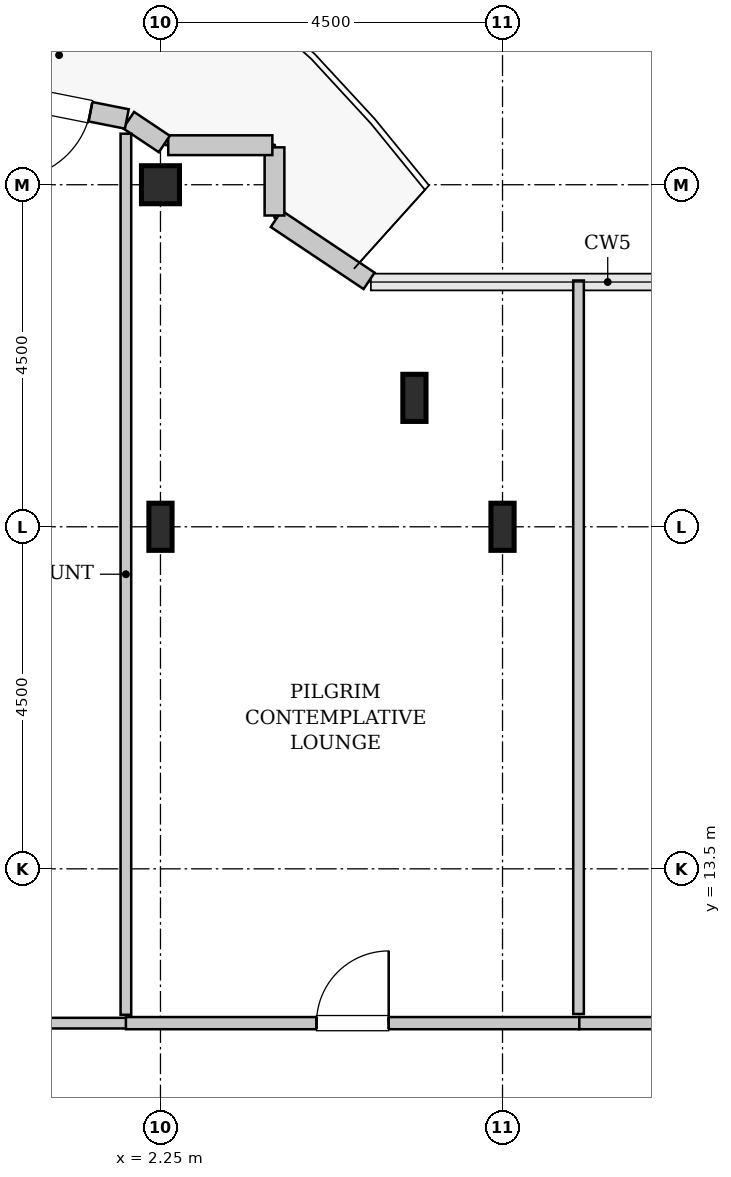
"""IFC4 building model, lengths in metres.
Left out: names, types, materials, properties, quantities, classifications, styles, units other than length and angle.
Written with IfcOpenShell. Run it as: python <this file> out.ifc"""

import sys

from ifc_helpers import new_model, si_unit, direction, frame, frame_2d, origin, origin_2d, place, context, subcontext, project, spatial, rectangle, hollow_rectangle, i_section, extrude, source, transform, mapped, element, fill, save


model = new_model("IFC4")
c1 = context("Model", 3, precision=1e-05, world=origin(), true_north=direction((0.0, 1.0)))
c2 = subcontext(c1, "Body", "Model", "MODEL_VIEW")
j1 = project(units=[si_unit("LENGTHUNIT", "METRE"), si_unit("PLANEANGLEUNIT", "RADIAN")], contexts=[c1])
p1 = place(None, origin())
s1 = spatial("IfcSite", under=j1, at=p1, CompositionType="ELEMENT")
p2 = place(p1, origin())
s2 = spatial("IfcBuilding", under=s1, at=p2, CompositionType="ELEMENT")
p3 = place(p2, frame((0.0, 0.0, 330.0)))
s3 = spatial("IfcBuildingStorey", under=s2, at=p3, CompositionType="ELEMENT", Elevation=330.0)
m1 = source(origin(), c2, "Body", "SweptSolid", [
    extrude(i_section(OverallWidth=0.305, OverallDepth=0.62, WebThickness=0.021, FlangeThickness=0.04, FilletRadius=0.027, at=origin_2d()), origin(), (0.0, 0.0, 1.0), 3.8),
])
p4 = place(p3, frame((2.25, 18.0, 0.0), z_axis=(0.0, 0.0, 1.0), x_axis=(1.0, 0.0, 0.0)))
e1 = element("IfcColumn", 1, at=p4, inside=s3, PredefinedType="COLUMN", context=c2, shape_type="MappedRepresentation", body=[
    mapped(m1, transform((0.0, 0.0, 0.0), x_axis=(1.0, 0.0, 0.0), y_axis=(0.0, 1.0, 0.0), z_axis=(0.0, 0.0, 1.0), scale=1.0)),
])
m2 = source(origin(), c2, "Body", "SweptSolid", [
    extrude(hollow_rectangle(XDim=0.5, YDim=0.5, WallThickness=0.025, InnerFilletRadius=0.025, OuterFilletRadius=0.05, at=origin_2d()), origin(), (0.0, 0.0, 1.0), 3.8),
])
p5 = place(p3, frame((2.25, 22.5, 0.0), z_axis=(0.0, 0.0, 1.0), x_axis=(1.0, 0.0, 0.0)))
e2 = element("IfcColumn", 2, at=p5, inside=s3, PredefinedType="COLUMN", context=c2, shape_type="MappedRepresentation", body=[
    mapped(m2, transform((0.0, 0.0, 0.0), x_axis=(1.0, 0.0, 0.0), y_axis=(0.0, 1.0, 0.0), z_axis=(0.0, 0.0, 1.0), scale=1.0)),
])
for number, where, z_axis, x_axis in (
    (3, (5.591, 19.696, 0.0), (0.0, 0.0, 1.0), (1.0, 0.0, 0.0)),
    (4, (6.75, 18.0, 0.0), (0.0, 0.0, 1.0), (1.0, 0.0, 0.0)),
):
    element("IfcColumn", number, at=place(p3, frame(where, z_axis=z_axis, x_axis=x_axis)), inside=s3, PredefinedType="COLUMN", context=c2, shape_type="MappedRepresentation", body=[
        mapped(m1, transform((0.0, 0.0, 0.0), x_axis=(1.0, 0.0, 0.0), y_axis=(0.0, 1.0, 0.0), z_axis=(0.0, 0.0, 1.0), scale=1.0)),
    ])
m3 = source(origin(), c2, "Body", "SweptSolid", [
    extrude(rectangle(XDim=1.469, YDim=0.26, at=frame_2d((0.734, 0.0))), origin(), (0.0, 0.0, 1.0), 3.55),
])
p6 = place(p3, frame((4.995, 21.236, 0.0), z_axis=(0.0, 0.0, 1.0), x_axis=(-0.831461760506, 0.555581983884, 0.0)))
e5 = element("IfcWall", 5, at=p6, inside=s3, PredefinedType="SOLIDWALL", context=c2, shape_type="MappedRepresentation", body=[
    mapped(m3, transform((0.0, 0.0, 0.0), x_axis=(1.0, 0.0, 0.0), y_axis=(0.0, 1.0, 0.0), z_axis=(0.0, 0.0, 1.0), scale=1.0)),
])
m4 = source(origin(), c2, "Body", "SweptSolid", [
    extrude(rectangle(XDim=0.897, YDim=0.26, at=frame_2d((0.448, 0.0))), origin(), (0.0, 0.0, 1.0), 3.55),
])
p7 = place(p3, frame((3.75, 22.095, 0.0), z_axis=(0.0, 0.0, 1.0), x_axis=(0.0, 1.0, 0.0)))
e6 = element("IfcWall", 6, at=p7, inside=s3, PredefinedType="SOLIDWALL", context=c2, shape_type="MappedRepresentation", body=[
    mapped(m4, transform((0.0, 0.0, 0.0), x_axis=(1.0, 0.0, 0.0), y_axis=(0.0, 1.0, 0.0), z_axis=(0.0, 0.0, 1.0), scale=1.0)),
])
m5 = source(origin(), c2, "Body", "SweptSolid", [
    extrude(rectangle(XDim=1.37, YDim=0.26, at=frame_2d((0.685, 0.0))), origin(), (0.0, 0.0, 1.0), 3.55),
])
p8 = place(p3, frame((3.722, 23.02, 0.0), z_axis=(0.0, 0.0, 1.0), x_axis=(-1.0, 0.0, 0.0)))
e7 = element("IfcWall", 7, at=p8, inside=s3, PredefinedType="SOLIDWALL", context=c2, shape_type="MappedRepresentation", body=[
    mapped(m5, transform((0.0, 0.0, 0.0), x_axis=(1.0, 0.0, 0.0), y_axis=(0.0, 1.0, 0.0), z_axis=(0.0, 0.0, 1.0), scale=1.0)),
])
m6 = source(origin(), c2, "Body", "SweptSolid", [
    extrude(rectangle(XDim=0.565, YDim=0.26, at=frame_2d((0.283, 0.0))), origin(), (0.0, 0.0, 1.0), 3.55),
])
p9 = place(p3, frame((2.301, 23.036, 0.0), z_axis=(0.0, 0.0, 1.0), x_axis=(-0.831651492666, 0.555297933317, 0.0)))
e8 = element("IfcWall", 8, at=p9, inside=s3, PredefinedType="SOLIDWALL", context=c2, shape_type="MappedRepresentation", body=[
    mapped(m6, transform((0.0, 0.0, 0.0), x_axis=(1.0, 0.0, 0.0), y_axis=(0.0, 1.0, 0.0), z_axis=(0.0, 0.0, 1.0), scale=1.0)),
])
m7 = source(origin(), c2, "Body", "SweptSolid", [
    extrude(rectangle(XDim=4.137, YDim=0.26, at=frame_2d((2.068, 0.0))), origin(), (0.0, 0.0, 1.0), 3.55),
])
p10 = place(p3, frame((1.807, 23.365, 0.0), z_axis=(0.0, 0.0, 1.0), x_axis=(-0.980782170794, 0.195105954428, 0.0)))
e9 = element("IfcWall", 9, at=p10, inside=s3, PredefinedType="SOLIDWALL", context=c2, shape_type="MappedRepresentation", body=[
    mapped(m7, transform((0.0, 0.0, 0.0), x_axis=(1.0, 0.0, 0.0), y_axis=(0.0, 1.0, 0.0), z_axis=(0.0, 0.0, 1.0), scale=1.0)),
])
p11 = place(p10, frame((0.488, 0.0, 0.0)))
e10 = element("IfcOpeningElement", 10, at=p11, cuts=e9, PredefinedType="OPENING", context=c2, shape_type="SweptSolid", body=[
    extrude(rectangle(XDim=1.1, YDim=2.2, at=frame_2d((0.55, 1.1))), frame((0.0, 0.14, 0.0), z_axis=(0.0, -1.0, 0.0), x_axis=(1.0, 0.0, 0.0)), (0.0, 0.0, 1.0), 0.28),
])
m8 = source(origin(), c2, "Body", "SweptSolid", [
    extrude(rectangle(XDim=4.625, YDim=0.14, at=frame_2d((2.312, 0.0))), origin(), (0.0, 0.0, 1.0), 3.535),
])
p12 = place(p3, frame((-2.82, 11.47, 0.0), z_axis=(0.0, 0.0, 1.0), x_axis=(1.0, 0.0, 0.0)))
e11 = element("IfcWall", 11, at=p12, inside=s3, PredefinedType="PARTITIONING", context=c2, shape_type="MappedRepresentation", body=[
    mapped(m8, transform((0.0, 0.0, 0.0), x_axis=(1.0, 0.0, 0.0), y_axis=(0.0, 1.0, 0.0), z_axis=(0.0, 0.0, 1.0), scale=1.0)),
])
m9 = source(origin(), c2, "Body", "SweptSolid", [
    extrude(rectangle(XDim=11.591, YDim=0.14, at=frame_2d((5.796, 0.0))), origin(), (0.0, 0.0, 1.0), 2.975),
])
p13 = place(p3, frame((1.795, 11.58, 0.0), z_axis=(0.0, 0.0, 1.0), x_axis=(0.0, 1.0, 0.0)))
e12 = element("IfcWall", 12, at=p13, inside=s3, PredefinedType="PARTITIONING", context=c2, shape_type="MappedRepresentation", body=[
    mapped(m9, transform((0.0, 0.0, 0.0), x_axis=(1.0, 0.0, 0.0), y_axis=(0.0, 1.0, 0.0), z_axis=(0.0, 0.0, 1.0), scale=1.0)),
])
m10 = source(origin(), c2, "Body", "SweptSolid", [
    extrude(rectangle(XDim=5.965, YDim=0.16, at=frame_2d((2.982, 0.0))), origin(), (0.0, 0.0, 1.0), 3.535),
])
p14 = place(p3, frame((1.795, 11.47, 0.0), z_axis=(0.0, 0.0, 1.0), x_axis=(1.0, 0.0, 0.0)))
e13 = element("IfcWall", 13, at=p14, inside=s3, PredefinedType="PARTITIONING", context=c2, shape_type="MappedRepresentation", body=[
    mapped(m10, transform((0.0, 0.0, 0.0), x_axis=(1.0, 0.0, 0.0), y_axis=(0.0, 1.0, 0.0), z_axis=(0.0, 0.0, 1.0), scale=1.0)),
])
p15 = place(p14, frame((2.508, 0.0, 0.0)))
e14 = element("IfcOpeningElement", 14, at=p15, cuts=e13, PredefinedType="OPENING", context=c2, shape_type="SweptSolid", body=[
    extrude(rectangle(XDim=0.95, YDim=2.1, at=frame_2d((0.475, 1.05))), frame((0.0, 0.09, 0.0), z_axis=(0.0, -1.0, 0.0), x_axis=(1.0, 0.0, 0.0)), (0.0, 0.0, 1.0), 0.18),
])
m11 = source(origin(), c2, "Body", "SweptSolid", [
    extrude(rectangle(XDim=9.65, YDim=0.14, at=frame_2d((4.825, 0.0))), origin(), (0.0, 0.0, 1.0), 3.535),
])
p16 = place(p3, frame((7.75, 11.59, 0.0), z_axis=(0.0, 0.0, 1.0), x_axis=(0.0, 1.0, 0.0)))
e15 = element("IfcWall", 15, at=p16, inside=s3, PredefinedType="PARTITIONING", context=c2, shape_type="MappedRepresentation", body=[
    mapped(m11, transform((0.0, 0.0, 0.0), x_axis=(1.0, 0.0, 0.0), y_axis=(0.0, 1.0, 0.0), z_axis=(0.0, 0.0, 1.0), scale=1.0)),
])
m12 = source(origin(), c2, "Body", "SweptSolid", [
    extrude(rectangle(XDim=5.86, YDim=0.16, at=frame_2d((2.93, 0.0))), origin(), (0.0, 0.0, 1.0), 3.535),
])
p17 = place(p3, frame((7.76, 11.47, 0.0), z_axis=(0.0, 0.0, 1.0), x_axis=(1.0, 0.0, 0.0)))
e16 = element("IfcWall", 16, at=p17, inside=s3, PredefinedType="PARTITIONING", context=c2, shape_type="MappedRepresentation", body=[
    mapped(m12, transform((0.0, 0.0, 0.0), x_axis=(1.0, 0.0, 0.0), y_axis=(0.0, 1.0, 0.0), z_axis=(0.0, 0.0, 1.0), scale=1.0)),
])
p18 = place(p17, frame((2.455, 0.0, 0.0)))
e17 = element("IfcOpeningElement", 17, at=p18, cuts=e16, PredefinedType="OPENING", context=c2, shape_type="SweptSolid", body=[
    extrude(rectangle(XDim=0.95, YDim=2.1, at=frame_2d((0.475, 1.05))), frame((0.0, 0.09, 0.0), z_axis=(0.0, -1.0, 0.0), x_axis=(1.0, 0.0, 0.0)), (0.0, 0.0, 1.0), 0.18),
])
m13 = source(origin(), c2, "Body", "SweptSolid", [
    extrude(rectangle(XDim=1.1, YDim=2.2, at=frame_2d((0.55, 1.1))), frame((0.0, 0.025, 0.0), z_axis=(0.0, -1.0, 0.0), x_axis=(1.0, 0.0, 0.0)), (0.0, 0.0, 1.0), 0.05),
])
p19 = place(p11, origin())
e18 = element("IfcDoor", 18, at=p19, inside=s3, OperationType="SINGLE_SWING_RIGHT", PredefinedType="DOOR", context=c2, shape_type="MappedRepresentation", body=[
    mapped(m13, transform((0.0, 0.0, 0.0), x_axis=(1.0, 0.0, 0.0), y_axis=(0.0, 1.0, 0.0), z_axis=(0.0, 0.0, 1.0), scale=1.0)),
])
fill(e10, e18)
m14 = source(origin(), c2, "Body", "SweptSolid", [
    extrude(rectangle(XDim=0.95, YDim=2.1, at=frame_2d((0.475, 1.05))), frame((0.0, 0.025, 0.0), z_axis=(0.0, -1.0, 0.0), x_axis=(1.0, 0.0, 0.0)), (0.0, 0.0, 1.0), 0.05),
])
p20 = place(p15, origin())
e19 = element("IfcDoor", 19, at=p20, inside=s3, OperationType="SINGLE_SWING_RIGHT", PredefinedType="DOOR", context=c2, shape_type="MappedRepresentation", body=[
    mapped(m14, transform((0.0, 0.0, 0.0), x_axis=(1.0, 0.0, 0.0), y_axis=(0.0, 1.0, 0.0), z_axis=(0.0, 0.0, 1.0), scale=1.0)),
])
fill(e14, e19)
save(model, sys.argv[1])
